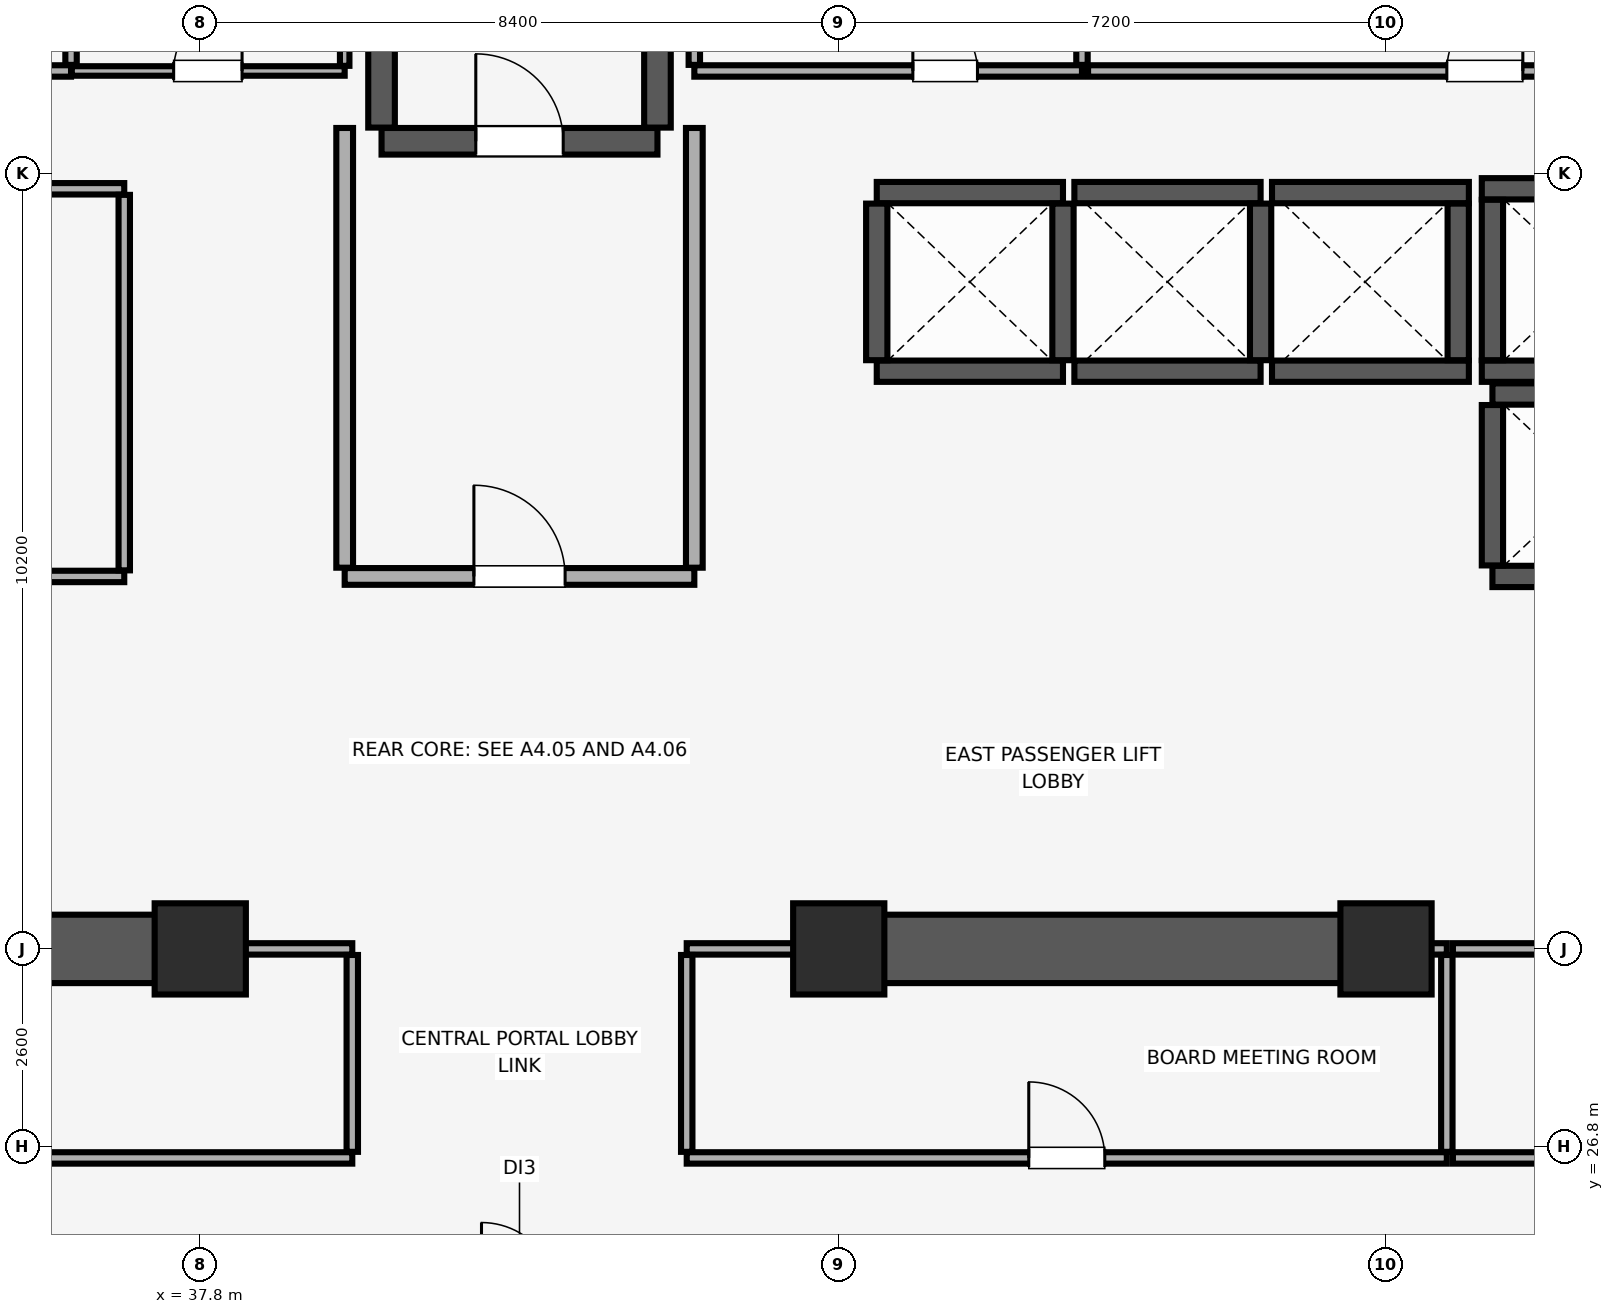
"""IFC4 building model, lengths in metres.
Left out: names, types, materials, properties, quantities, classifications, styles, units other than length and angle.
Written with IfcOpenShell. Run it as: python <this file> out.ifc"""

import sys

from ifc_helpers import new_model, si_unit, direction, frame, frame_2d, origin, origin_2d, place, context, subcontext, project, spatial, rectangle, extrude, element, fill, save


model = new_model("IFC4")
c1 = context("Model", 3, precision=1e-05, world=origin(), true_north=direction((0.0, 1.0)))
c2 = subcontext(c1, "Body", "Model", "MODEL_VIEW")
j1 = project(units=[si_unit("LENGTHUNIT", "METRE"), si_unit("PLANEANGLEUNIT", "RADIAN")], contexts=[c1])
p1 = place(None, origin())
s1 = spatial("IfcSite", under=j1, at=p1, CompositionType="ELEMENT")
p2 = place(p1, origin())
s2 = spatial("IfcBuilding", under=s1, at=p2, CompositionType="ELEMENT")
p3 = place(p2, frame((0.0, 0.0, 126.8)))
s3 = spatial("IfcBuildingStorey", under=s2, at=p3, CompositionType="ELEMENT", Elevation=126.8)
for number, where, z_axis, x_axis in (
    (1, (37.8, 29.4, 0.0), (0.0, 0.0, 1.0), (1.0, 0.0, 0.0)),
    (2, (46.2, 29.4, 0.0), (0.0, 0.0, 1.0), (1.0, 0.0, 0.0)),
    (3, (53.4, 29.4, 0.0), (0.0, 0.0, 1.0), (1.0, 0.0, 0.0)),
):
    element("IfcColumn", number, at=place(p3, frame(where, z_axis=z_axis, x_axis=x_axis)), inside=s3, PredefinedType="COLUMN", context=c2, shape_type="SweptSolid", body=[
        extrude(rectangle(XDim=1.2, YDim=1.2, at=origin_2d()), origin(), (0.0, 0.0, 1.0), 3.51),
    ])
for number, where, z_axis, x_axis in (
    (4, (30.4, 29.4, 0.0), (0.0, 0.0, 1.0), (1.0, 0.0, 0.0)),
    (5, (46.0, 29.4, 0.0), (0.0, 0.0, 1.0), (1.0, 0.0, 0.0)),
):
    element("IfcWall", number, at=place(p3, frame(where, z_axis=z_axis, x_axis=x_axis)), inside=s3, PredefinedType="SHEAR", context=c2, shape_type="SweptSolid", body=[
        extrude(rectangle(XDim=7.6, YDim=0.9, at=frame_2d((3.8, 0.0))), origin(), (0.0, 0.0, 1.0), 3.51),
    ])
p4 = place(p3, frame((40.185, 40.025, 0.0), z_axis=(0.0, 0.0, 1.0), x_axis=(1.0, 0.0, 0.0)))
e6 = element("IfcWall", 6, at=p4, inside=s3, PredefinedType="SHEAR", context=c2, shape_type="SweptSolid", body=[
    extrude(rectangle(XDim=3.63, YDim=0.35, at=frame_2d((1.815, 0.0))), origin(), (0.0, 0.0, 1.0), 3.51),
])
p5 = place(p4, frame((1.24, 0.0, 0.0)))
e7 = element("IfcOpeningElement", 7, at=p5, cuts=e6, PredefinedType="OPENING", context=c2, shape_type="SweptSolid", body=[
    extrude(rectangle(XDim=1.15, YDim=2.15, at=frame_2d((0.575, 1.075))), frame((0.0, 0.185, 0.0), z_axis=(0.0, -1.0, 0.0), x_axis=(1.0, 0.0, 0.0)), (0.0, 0.0, 1.0), 0.37),
])
for number, where, z_axis, x_axis in (
    (8, (40.185, 40.205, 0.0), (0.0, 0.0, 1.0), (0.0, 1.0, 0.0)),
    (9, (43.815, 40.205, 0.0), (0.0, 0.0, 1.0), (0.0, 1.0, 0.0)),
):
    element("IfcWall", number, at=place(p3, frame(where, z_axis=z_axis, x_axis=x_axis)), inside=s3, PredefinedType="SHEAR", context=c2, shape_type="SweptSolid", body=[
        extrude(rectangle(XDim=8.09, YDim=0.35, at=frame_2d((4.045, 0.0))), origin(), (0.0, 0.0, 1.0), 3.51),
    ])
for number, where, z_axis, x_axis in (
    (10, (46.7, 37.0, 0.0), (0.0, 0.0, 1.0), (1.0, 0.0, 0.0)),
    (11, (46.7, 39.35, 0.0), (0.0, 0.0, 1.0), (1.0, 0.0, 0.0)),
):
    element("IfcWall", number, at=place(p3, frame(where, z_axis=z_axis, x_axis=x_axis)), inside=s3, PredefinedType="SHEAR", context=c2, shape_type="SweptSolid", body=[
        extrude(rectangle(XDim=2.45, YDim=0.28, at=frame_2d((1.225, 0.0))), origin(), (0.0, 0.0, 1.0), 3.51),
    ])
for number, where, z_axis, x_axis in (
    (12, (46.7, 37.145, 0.0), (0.0, 0.0, 1.0), (0.0, 1.0, 0.0)),
    (13, (49.15, 37.145, 0.0), (0.0, 0.0, 1.0), (0.0, 1.0, 0.0)),
):
    element("IfcWall", number, at=place(p3, frame(where, z_axis=z_axis, x_axis=x_axis)), inside=s3, PredefinedType="SHEAR", context=c2, shape_type="SweptSolid", body=[
        extrude(rectangle(XDim=2.06, YDim=0.28, at=frame_2d((1.03, 0.0))), origin(), (0.0, 0.0, 1.0), 3.51),
    ])
for number, where, z_axis, x_axis in (
    (14, (49.3, 37.0, 0.0), (0.0, 0.0, 1.0), (1.0, 0.0, 0.0)),
    (15, (49.3, 39.35, 0.0), (0.0, 0.0, 1.0), (1.0, 0.0, 0.0)),
):
    element("IfcWall", number, at=place(p3, frame(where, z_axis=z_axis, x_axis=x_axis)), inside=s3, PredefinedType="SHEAR", context=c2, shape_type="SweptSolid", body=[
        extrude(rectangle(XDim=2.45, YDim=0.28, at=frame_2d((1.225, 0.0))), origin(), (0.0, 0.0, 1.0), 3.51),
    ])
p6 = place(p3, frame((51.75, 37.145, 0.0), z_axis=(0.0, 0.0, 1.0), x_axis=(0.0, 1.0, 0.0)))
e16 = element("IfcWall", 16, at=p6, inside=s3, PredefinedType="SHEAR", context=c2, shape_type="SweptSolid", body=[
    extrude(rectangle(XDim=2.06, YDim=0.28, at=frame_2d((1.03, 0.0))), origin(), (0.0, 0.0, 1.0), 3.51),
])
for number, where, z_axis, x_axis in (
    (17, (51.9, 37.0, 0.0), (0.0, 0.0, 1.0), (1.0, 0.0, 0.0)),
    (18, (51.9, 39.35, 0.0), (0.0, 0.0, 1.0), (1.0, 0.0, 0.0)),
):
    element("IfcWall", number, at=place(p3, frame(where, z_axis=z_axis, x_axis=x_axis)), inside=s3, PredefinedType="SHEAR", context=c2, shape_type="SweptSolid", body=[
        extrude(rectangle(XDim=2.59, YDim=0.28, at=frame_2d((1.295, 0.0))), origin(), (0.0, 0.0, 1.0), 3.51),
    ])
p7 = place(p3, frame((54.35, 37.145, 0.0), z_axis=(0.0, 0.0, 1.0), x_axis=(0.0, 1.0, 0.0)))
e19 = element("IfcWall", 19, at=p7, inside=s3, PredefinedType="SHEAR", context=c2, shape_type="SweptSolid", body=[
    extrude(rectangle(XDim=2.06, YDim=0.28, at=frame_2d((1.03, 0.0))), origin(), (0.0, 0.0, 1.0), 3.51),
])
for number, where, z_axis, x_axis in (
    (20, (54.8, 34.3, 0.0), (0.0, 0.0, 1.0), (1.0, 0.0, 0.0)),
    (21, (54.8, 36.7, 0.0), (0.0, 0.0, 1.0), (1.0, 0.0, 0.0)),
):
    element("IfcWall", number, at=place(p3, frame(where, z_axis=z_axis, x_axis=x_axis)), inside=s3, PredefinedType="SHEAR", context=c2, shape_type="SweptSolid", body=[
        extrude(rectangle(XDim=2.55, YDim=0.28, at=frame_2d((1.275, 0.0))), origin(), (0.0, 0.0, 1.0), 3.51),
    ])
p8 = place(p3, frame((54.8, 34.445, 0.0), z_axis=(0.0, 0.0, 1.0), x_axis=(0.0, 1.0, 0.0)))
e22 = element("IfcWall", 22, at=p8, inside=s3, PredefinedType="SHEAR", context=c2, shape_type="SweptSolid", body=[
    extrude(rectangle(XDim=2.11, YDim=0.28, at=frame_2d((1.055, 0.0))), origin(), (0.0, 0.0, 1.0), 3.51),
])
for number, where, z_axis, x_axis in (
    (23, (54.66, 37.0, 0.0), (0.0, 0.0, 1.0), (1.0, 0.0, 0.0)),
    (24, (54.66, 39.4, 0.0), (0.0, 0.0, 1.0), (1.0, 0.0, 0.0)),
):
    element("IfcWall", number, at=place(p3, frame(where, z_axis=z_axis, x_axis=x_axis)), inside=s3, PredefinedType="SHEAR", context=c2, shape_type="SweptSolid", body=[
        extrude(rectangle(XDim=2.83, YDim=0.28, at=frame_2d((1.415, 0.0))), origin(), (0.0, 0.0, 1.0), 3.51),
    ])
p9 = place(p3, frame((54.8, 37.145, 0.0), z_axis=(0.0, 0.0, 1.0), x_axis=(0.0, 1.0, 0.0)))
e25 = element("IfcWall", 25, at=p9, inside=s3, PredefinedType="SHEAR", context=c2, shape_type="SweptSolid", body=[
    extrude(rectangle(XDim=2.11, YDim=0.28, at=frame_2d((1.055, 0.0))), origin(), (0.0, 0.0, 1.0), 3.51),
])
p10 = place(p3, frame((39.7, 34.3, 0.0), z_axis=(0.0, 0.0, 1.0), x_axis=(1.0, 0.0, 0.0)))
e26 = element("IfcWall", 26, at=p10, inside=s3, PredefinedType="PARTITIONING", context=c2, shape_type="SweptSolid", body=[
    extrude(rectangle(XDim=4.6, YDim=0.22, at=frame_2d((2.3, 0.0))), origin(), (0.0, 0.0, 1.0), 3.51),
])
p11 = place(p10, frame((1.7, 0.0, 0.0)))
e27 = element("IfcOpeningElement", 27, at=p11, cuts=e26, PredefinedType="OPENING", context=c2, shape_type="SweptSolid", body=[
    extrude(rectangle(XDim=1.2, YDim=2.15, at=frame_2d((0.6, 1.075))), frame((0.0, 0.12, 0.0), z_axis=(0.0, -1.0, 0.0), x_axis=(1.0, 0.0, 0.0)), (0.0, 0.0, 1.0), 0.24),
])
for number, where, z_axis, x_axis in (
    (28, (39.7, 34.415, 0.0), (0.0, 0.0, 1.0), (0.0, 1.0, 0.0)),
    (29, (44.3, 34.415, 0.0), (0.0, 0.0, 1.0), (0.0, 1.0, 0.0)),
):
    element("IfcWall", number, at=place(p3, frame(where, z_axis=z_axis, x_axis=x_axis)), inside=s3, PredefinedType="PARTITIONING", context=c2, shape_type="SweptSolid", body=[
        extrude(rectangle(XDim=5.785, YDim=0.22, at=frame_2d((2.893, 0.0))), origin(), (0.0, 0.0, 1.0), 3.51),
    ])
p12 = place(p3, frame((31.6, 34.3, 0.0), z_axis=(0.0, 0.0, 1.0), x_axis=(1.0, 0.0, 0.0)))
e30 = element("IfcWall", 30, at=p12, inside=s3, PredefinedType="PARTITIONING", context=c2, shape_type="SweptSolid", body=[
    extrude(rectangle(XDim=5.2, YDim=0.15, at=frame_2d((2.6, 0.0))), origin(), (0.0, 0.0, 1.0), 3.51),
])
p13 = place(p12, frame((2.175, 0.0, 0.0)))
e31 = element("IfcOpeningElement", 31, at=p13, cuts=e30, PredefinedType="OPENING", context=c2, shape_type="SweptSolid", body=[
    extrude(rectangle(XDim=0.85, YDim=2.1, at=frame_2d((0.425, 1.05))), frame((0.0, 0.085, 0.0), z_axis=(0.0, -1.0, 0.0), x_axis=(1.0, 0.0, 0.0)), (0.0, 0.0, 1.0), 0.17),
])
p14 = place(p3, frame((31.6, 39.4, 0.0), z_axis=(0.0, 0.0, 1.0), x_axis=(1.0, 0.0, 0.0)))
e32 = element("IfcWall", 32, at=p14, inside=s3, PredefinedType="PARTITIONING", context=c2, shape_type="SweptSolid", body=[
    extrude(rectangle(XDim=5.2, YDim=0.15, at=frame_2d((2.6, 0.0))), origin(), (0.0, 0.0, 1.0), 3.51),
])
p15 = place(p3, frame((36.8, 34.38, 0.0), z_axis=(0.0, 0.0, 1.0), x_axis=(0.0, 1.0, 0.0)))
e33 = element("IfcWall", 33, at=p15, inside=s3, PredefinedType="PARTITIONING", context=c2, shape_type="SweptSolid", body=[
    extrude(rectangle(XDim=4.94, YDim=0.15, at=frame_2d((2.47, 0.0))), origin(), (0.0, 0.0, 1.0), 3.51),
])
p16 = place(p3, frame((28.41, 40.95, 0.0), z_axis=(0.0, 0.0, 1.0), x_axis=(1.0, 0.0, 0.0)))
e34 = element("IfcWall", 34, at=p16, inside=s3, PredefinedType="PARTITIONING", context=c2, shape_type="SweptSolid", body=[
    extrude(rectangle(XDim=7.69, YDim=0.15, at=frame_2d((3.845, 0.0))), origin(), (0.0, 0.0, 1.0), 3.51),
])
p17 = place(p16, frame((3.415, 0.0, 0.0)))
e35 = element("IfcOpeningElement", 35, at=p17, cuts=e34, PredefinedType="OPENING", context=c2, shape_type="SweptSolid", body=[
    extrude(rectangle(XDim=0.85, YDim=2.1, at=frame_2d((0.425, 1.05))), frame((0.0, 0.085, 0.0), z_axis=(0.0, -1.0, 0.0), x_axis=(1.0, 0.0, 0.0)), (0.0, 0.0, 1.0), 0.17),
])
p18 = place(p3, frame((36.1, 41.03, 0.0), z_axis=(0.0, 0.0, 1.0), x_axis=(0.0, 1.0, 0.0)))
e36 = element("IfcWall", 36, at=p18, inside=s3, PredefinedType="PARTITIONING", context=c2, shape_type="SweptSolid", body=[
    extrude(rectangle(XDim=7.82, YDim=0.15, at=frame_2d((3.91, 0.0))), origin(), (0.0, 0.0, 1.0), 3.51),
])
p19 = place(p3, frame((36.11, 40.95, 0.0), z_axis=(0.0, 0.0, 1.0), x_axis=(1.0, 0.0, 0.0)))
e37 = element("IfcWall", 37, at=p19, inside=s3, PredefinedType="PARTITIONING", context=c2, shape_type="SweptSolid", body=[
    extrude(rectangle(XDim=3.59, YDim=0.125, at=frame_2d((1.795, 0.0))), origin(), (0.0, 0.0, 1.0), 3.51),
])
p20 = place(p19, frame((1.34, 0.0, 0.0)))
e38 = element("IfcOpeningElement", 38, at=p20, cuts=e37, PredefinedType="OPENING", context=c2, shape_type="SweptSolid", body=[
    extrude(rectangle(XDim=0.9, YDim=2.1, at=frame_2d((0.45, 1.05))), frame((0.0, 0.073, 0.0), z_axis=(0.0, -1.0, 0.0), x_axis=(1.0, 0.0, 0.0)), (0.0, 0.0, 1.0), 0.145),
])
p21 = place(p3, frame((39.7, 41.018, 0.0), z_axis=(0.0, 0.0, 1.0), x_axis=(0.0, 1.0, 0.0)))
e39 = element("IfcWall", 39, at=p21, inside=s3, PredefinedType="PARTITIONING", context=c2, shape_type="SweptSolid", body=[
    extrude(rectangle(XDim=3.715, YDim=0.125, at=frame_2d((1.857, 0.0))), origin(), (0.0, 0.0, 1.0), 3.51),
])
p22 = place(p3, frame((44.3, 40.95, 0.0), z_axis=(0.0, 0.0, 1.0), x_axis=(1.0, 0.0, 0.0)))
e40 = element("IfcWall", 40, at=p22, inside=s3, PredefinedType="PARTITIONING", context=c2, shape_type="SweptSolid", body=[
    extrude(rectangle(XDim=5.1, YDim=0.15, at=frame_2d((2.55, 0.0))), origin(), (0.0, 0.0, 1.0), 3.51),
])
p23 = place(p22, frame((2.875, 0.0, 0.0)))
e41 = element("IfcOpeningElement", 41, at=p23, cuts=e40, PredefinedType="OPENING", context=c2, shape_type="SweptSolid", body=[
    extrude(rectangle(XDim=0.85, YDim=2.1, at=frame_2d((0.425, 1.05))), frame((0.0, 0.085, 0.0), z_axis=(0.0, -1.0, 0.0), x_axis=(1.0, 0.0, 0.0)), (0.0, 0.0, 1.0), 0.17),
])
for number, where, z_axis, x_axis in (
    (42, (44.3, 41.03, 0.0), (0.0, 0.0, 1.0), (0.0, 1.0, 0.0)),
    (43, (49.4, 41.03, 0.0), (0.0, 0.0, 1.0), (0.0, 1.0, 0.0)),
):
    element("IfcWall", number, at=place(p3, frame(where, z_axis=z_axis, x_axis=x_axis)), inside=s3, PredefinedType="PARTITIONING", context=c2, shape_type="SweptSolid", body=[
        extrude(rectangle(XDim=7.82, YDim=0.15, at=frame_2d((3.91, 0.0))), origin(), (0.0, 0.0, 1.0), 3.51),
    ])
p24 = place(p3, frame((49.48, 40.95, 0.0), z_axis=(0.0, 0.0, 1.0), x_axis=(1.0, 0.0, 0.0)))
e44 = element("IfcWall", 44, at=p24, inside=s3, PredefinedType="PARTITIONING", context=c2, shape_type="SweptSolid", body=[
    extrude(rectangle(XDim=8.02, YDim=0.15, at=frame_2d((4.01, 0.0))), origin(), (0.0, 0.0, 1.0), 3.51),
])
p25 = place(p24, frame((4.72, 0.0, 0.0)))
e45 = element("IfcOpeningElement", 45, at=p25, cuts=e44, PredefinedType="OPENING", context=c2, shape_type="SweptSolid", body=[
    extrude(rectangle(XDim=1.0, YDim=2.15, at=frame_2d((0.5, 1.075))), frame((0.0, 0.085, 0.0), z_axis=(0.0, -1.0, 0.0), x_axis=(1.0, 0.0, 0.0)), (0.0, 0.0, 1.0), 0.17),
])
p26 = place(p3, frame((25.28, 26.65, 0.0), z_axis=(0.0, 0.0, 1.0), x_axis=(1.0, 0.0, 0.0)))
e46 = element("IfcWall", 46, at=p26, inside=s3, PredefinedType="PARTITIONING", context=c2, shape_type="SweptSolid", body=[
    extrude(rectangle(XDim=14.52, YDim=0.15, at=frame_2d((7.26, 0.0))), origin(), (0.0, 0.0, 1.0), 3.51),
])
p27 = place(p26, frame((6.72, 0.0, 0.0)))
e47 = element("IfcOpeningElement", 47, at=p27, cuts=e46, PredefinedType="OPENING", context=c2, shape_type="SweptSolid", body=[
    extrude(rectangle(XDim=1.0, YDim=2.15, at=frame_2d((0.5, 1.075))), frame((0.0, 0.085, 0.0), z_axis=(0.0, -1.0, 0.0), x_axis=(1.0, 0.0, 0.0)), (0.0, 0.0, 1.0), 0.17),
])
p28 = place(p3, frame((38.01, 29.4, 0.0), z_axis=(0.0, 0.0, 1.0), x_axis=(1.0, 0.0, 0.0)))
e48 = element("IfcWall", 48, at=p28, inside=s3, PredefinedType="PARTITIONING", context=c2, shape_type="SweptSolid", body=[
    extrude(rectangle(XDim=1.79, YDim=0.15, at=frame_2d((0.895, 0.0))), origin(), (0.0, 0.0, 1.0), 2.41),
])
p29 = place(p3, frame((39.8, 26.73, 0.0), z_axis=(0.0, 0.0, 1.0), x_axis=(0.0, 1.0, 0.0)))
e49 = element("IfcWall", 49, at=p29, inside=s3, PredefinedType="PARTITIONING", context=c2, shape_type="SweptSolid", body=[
    extrude(rectangle(XDim=2.59, YDim=0.15, at=frame_2d((1.295, 0.0))), origin(), (0.0, 0.0, 1.0), 3.51),
])
p30 = place(p3, frame((44.2, 26.65, 0.0), z_axis=(0.0, 0.0, 1.0), x_axis=(1.0, 0.0, 0.0)))
e50 = element("IfcWall", 50, at=p30, inside=s3, PredefinedType="PARTITIONING", context=c2, shape_type="SweptSolid", body=[
    extrude(rectangle(XDim=10.0, YDim=0.15, at=frame_2d((5.0, 0.0))), origin(), (0.0, 0.0, 1.0), 3.51),
])
p31 = place(p30, frame((4.5, 0.0, 0.0)))
e51 = element("IfcOpeningElement", 51, at=p31, cuts=e50, PredefinedType="OPENING", context=c2, shape_type="SweptSolid", body=[
    extrude(rectangle(XDim=1.0, YDim=2.15, at=frame_2d((0.5, 1.075))), frame((0.0, 0.085, 0.0), z_axis=(0.0, -1.0, 0.0), x_axis=(1.0, 0.0, 0.0)), (0.0, 0.0, 1.0), 0.17),
])
p32 = place(p3, frame((44.2, 29.4, 0.0), z_axis=(0.0, 0.0, 1.0), x_axis=(1.0, 0.0, 0.0)))
e52 = element("IfcWall", 52, at=p32, inside=s3, PredefinedType="PARTITIONING", context=c2, shape_type="SweptSolid", body=[
    extrude(rectangle(XDim=1.79, YDim=0.15, at=frame_2d((0.895, 0.0))), origin(), (0.0, 0.0, 1.0), 2.41),
])
p33 = place(p3, frame((53.61, 29.4, 0.0), z_axis=(0.0, 0.0, 1.0), x_axis=(1.0, 0.0, 0.0)))
e53 = element("IfcWall", 53, at=p33, inside=s3, PredefinedType="PARTITIONING", context=c2, shape_type="SweptSolid", body=[
    extrude(rectangle(XDim=0.59, YDim=0.15, at=frame_2d((0.295, 0.0))), origin(), (0.0, 0.0, 1.0), 2.41),
])
for number, where, z_axis, x_axis in (
    (54, (44.2, 26.73, 0.0), (0.0, 0.0, 1.0), (0.0, 1.0, 0.0)),
    (55, (54.2, 26.73, 0.0), (0.0, 0.0, 1.0), (0.0, 1.0, 0.0)),
):
    element("IfcWall", number, at=place(p3, frame(where, z_axis=z_axis, x_axis=x_axis)), inside=s3, PredefinedType="PARTITIONING", context=c2, shape_type="SweptSolid", body=[
        extrude(rectangle(XDim=2.59, YDim=0.15, at=frame_2d((1.295, 0.0))), origin(), (0.0, 0.0, 1.0), 3.51),
    ])
p34 = place(p3, frame((54.28, 26.65, 0.0), z_axis=(0.0, 0.0, 1.0), x_axis=(1.0, 0.0, 0.0)))
e56 = element("IfcWall", 56, at=p34, inside=s3, PredefinedType="PARTITIONING", context=c2, shape_type="SweptSolid", body=[
    extrude(rectangle(XDim=13.92, YDim=0.15, at=frame_2d((6.96, 0.0))), origin(), (0.0, 0.0, 1.0), 3.51),
])
p35 = place(p34, frame((7.17, 0.0, 0.0)))
e57 = element("IfcOpeningElement", 57, at=p35, cuts=e56, PredefinedType="OPENING", context=c2, shape_type="SweptSolid", body=[
    extrude(rectangle(XDim=1.0, YDim=2.15, at=frame_2d((0.5, 1.075))), frame((0.0, 0.085, 0.0), z_axis=(0.0, -1.0, 0.0), x_axis=(1.0, 0.0, 0.0)), (0.0, 0.0, 1.0), 0.17),
])
p36 = place(p3, frame((54.28, 29.4, 0.0), z_axis=(0.0, 0.0, 1.0), x_axis=(1.0, 0.0, 0.0)))
e58 = element("IfcWall", 58, at=p36, inside=s3, PredefinedType="PARTITIONING", context=c2, shape_type="SweptSolid", body=[
    extrude(rectangle(XDim=6.11, YDim=0.15, at=frame_2d((3.055, 0.0))), origin(), (0.0, 0.0, 1.0), 2.41),
])
p37 = place(p5, origin())
e59 = element("IfcDoor", 59, at=p37, inside=s3, OperationType="SINGLE_SWING_LEFT", PredefinedType="DOOR", context=c2, shape_type="SweptSolid", body=[
    extrude(rectangle(XDim=1.15, YDim=2.15, at=frame_2d((0.575, 1.075))), frame((0.0, 0.025, 0.0), z_axis=(0.0, -1.0, 0.0), x_axis=(1.0, 0.0, 0.0)), (0.0, 0.0, 1.0), 0.05),
])
fill(e7, e59)
p38 = place(p11, origin())
e60 = element("IfcDoor", 60, at=p38, inside=s3, OperationType="SINGLE_SWING_LEFT", PredefinedType="DOOR", context=c2, shape_type="SweptSolid", body=[
    extrude(rectangle(XDim=1.2, YDim=2.15, at=frame_2d((0.6, 1.075))), frame((0.0, 0.025, 0.0), z_axis=(0.0, -1.0, 0.0), x_axis=(1.0, 0.0, 0.0)), (0.0, 0.0, 1.0), 0.05),
])
fill(e27, e60)
p39 = place(p20, origin())
e61 = element("IfcDoor", 61, at=p39, inside=s3, OperationType="SINGLE_SWING_RIGHT", PredefinedType="DOOR", context=c2, shape_type="SweptSolid", body=[
    extrude(rectangle(XDim=0.9, YDim=2.1, at=frame_2d((0.45, 1.05))), frame((0.0, 0.025, 0.0), z_axis=(0.0, -1.0, 0.0), x_axis=(1.0, 0.0, 0.0)), (0.0, 0.0, 1.0), 0.05),
])
fill(e38, e61)
p40 = place(p23, origin())
e62 = element("IfcDoor", 62, at=p40, inside=s3, OperationType="SINGLE_SWING_LEFT", PredefinedType="DOOR", context=c2, shape_type="SweptSolid", body=[
    extrude(rectangle(XDim=0.85, YDim=2.1, at=frame_2d((0.425, 1.05))), frame((0.0, 0.025, 0.0), z_axis=(0.0, -1.0, 0.0), x_axis=(1.0, 0.0, 0.0)), (0.0, 0.0, 1.0), 0.05),
])
fill(e41, e62)
p41 = place(p25, origin())
e63 = element("IfcDoor", 63, at=p41, inside=s3, OperationType="SINGLE_SWING_RIGHT", PredefinedType="DOOR", context=c2, shape_type="SweptSolid", body=[
    extrude(rectangle(XDim=1.0, YDim=2.15, at=frame_2d((0.5, 1.075))), frame((0.0, 0.025, 0.0), z_axis=(0.0, -1.0, 0.0), x_axis=(1.0, 0.0, 0.0)), (0.0, 0.0, 1.0), 0.05),
])
fill(e45, e63)
p42 = place(p31, origin())
e64 = element("IfcDoor", 64, at=p42, inside=s3, OperationType="SINGLE_SWING_LEFT", PredefinedType="DOOR", context=c2, shape_type="SweptSolid", body=[
    extrude(rectangle(XDim=1.0, YDim=2.15, at=frame_2d((0.5, 1.075))), frame((0.0, 0.025, 0.0), z_axis=(0.0, -1.0, 0.0), x_axis=(1.0, 0.0, 0.0)), (0.0, 0.0, 1.0), 0.05),
])
fill(e51, e64)
save(model, sys.argv[1])
